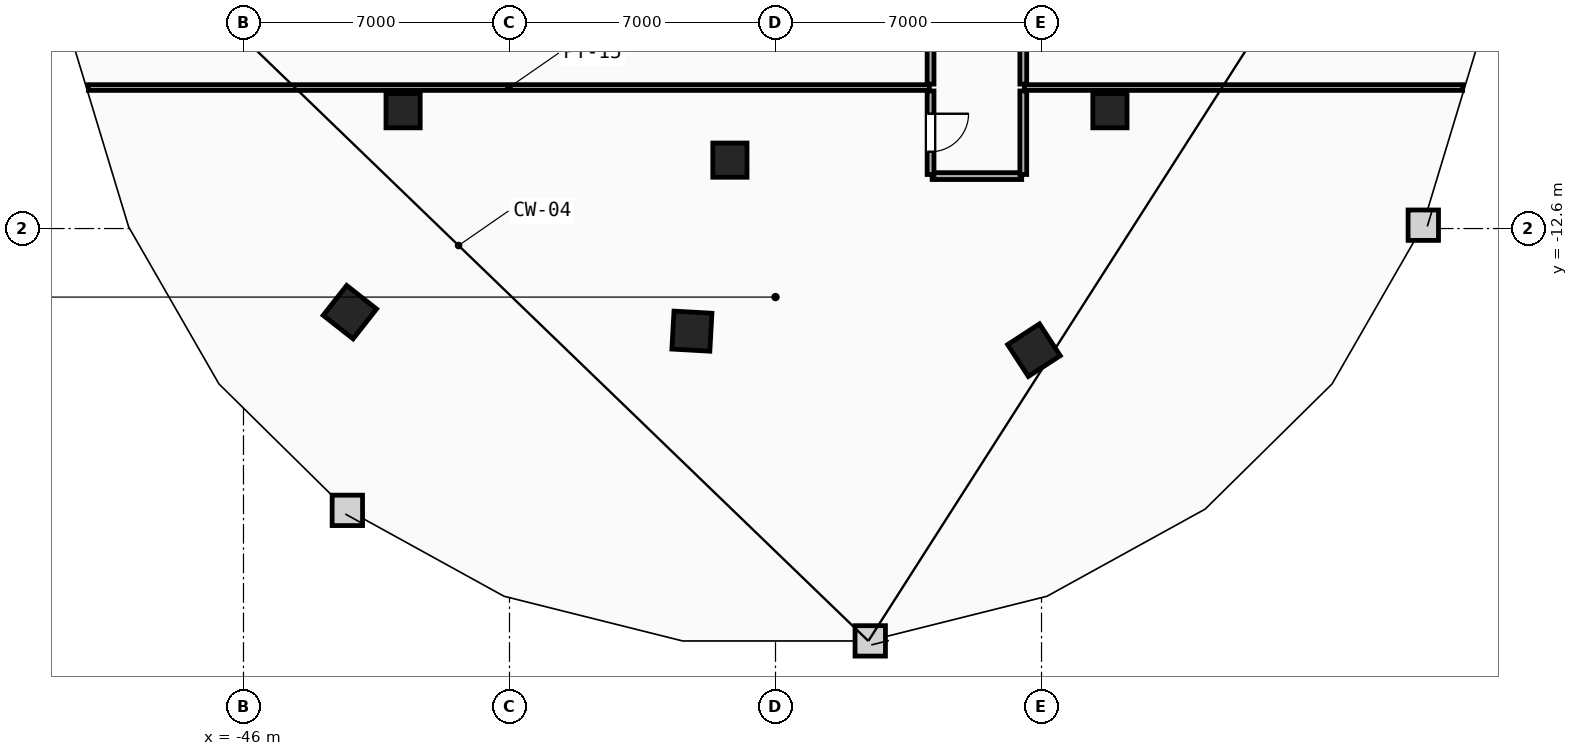
"""IFC4 building model, lengths in metres.
Left out: names, types, materials, properties, quantities, classifications, styles, units other than length and angle.
Written with IfcOpenShell. Run it as: python <this file> out.ifc"""

import sys

from ifc_helpers import new_model, si_unit, direction, frame, frame_2d, origin, origin_2d, place, context, subcontext, project, spatial, rectangle, extrude, element, fill, save


model = new_model("IFC4")
c1 = context("Model", 3, precision=1e-05, world=origin(), true_north=direction((0.0, 1.0)))
c2 = subcontext(c1, "Body", "Model", "MODEL_VIEW")
j1 = project(units=[si_unit("LENGTHUNIT", "METRE"), si_unit("PLANEANGLEUNIT", "RADIAN")], contexts=[c1])
p1 = place(None, origin())
s1 = spatial("IfcSite", under=j1, at=p1, CompositionType="ELEMENT")
p2 = place(p1, origin())
s2 = spatial("IfcBuilding", under=s1, at=p2, CompositionType="ELEMENT")
p3 = place(p2, frame((0.0, 0.0, 158.4)))
s3 = spatial("IfcBuildingStorey", under=s2, at=p3, CompositionType="ELEMENT", Elevation=158.4)
for number, where, z_axis, x_axis in (
    (1, (-41.8, -9.5, 0.0), (0.0, 0.0, 1.0), (1.0, 0.0, 0.0)),
    (2, (-33.2, -10.8, 0.0), (0.0, 0.0, 1.0), (1.0, 0.0, 0.0)),
    (3, (-23.2, -9.5, 0.0), (0.0, 0.0, 1.0), (1.0, 0.0, 0.0)),
):
    element("IfcColumn", number, at=place(p3, frame(where, z_axis=z_axis, x_axis=x_axis)), inside=s3, PredefinedType="COLUMN", context=c2, shape_type="SweptSolid", body=[
        extrude(rectangle(XDim=0.9, YDim=0.9, at=origin_2d()), origin(), (0.0, 0.0, 1.0), 3.6),
    ])
for number, where, z_axis, x_axis in (
    (4, (-43.2, -14.8, 0.0), (0.0, 0.0, 1.0), (0.786, -0.618, 0.0)),
    (5, (-34.2, -15.3, 0.0), (0.0, 0.0, 1.0), (0.998, -0.055, 0.0)),
    (6, (-25.2, -15.8, 0.0), (0.0, 0.0, 1.0), (0.838, 0.546, 0.0)),
):
    element("IfcColumn", number, at=place(p3, frame(where, z_axis=z_axis, x_axis=x_axis)), inside=s3, PredefinedType="COLUMN", context=c2, shape_type="SweptSolid", body=[
        extrude(rectangle(XDim=1.0, YDim=1.0, at=origin_2d()), origin(), (0.0, 0.0, 1.0), 3.6),
    ])
p4 = place(p3, frame((-50.082, -8.89, 0.0), z_axis=(0.0, 0.0, 1.0), x_axis=(1.0, 0.0, 0.0)))
e7 = element("IfcWall", 7, at=p4, inside=s3, PredefinedType="PARTITIONING", context=c2, shape_type="SweptSolid", body=[
    extrude(rectangle(XDim=22.132, YDim=0.15, at=frame_2d((11.066, 0.0))), origin(), (0.0, 0.0, 1.0), 3.36),
])
p5 = place(p3, frame((-25.45, -8.89, 0.0), z_axis=(0.0, 0.0, 1.0), x_axis=(1.0, 0.0, 0.0)))
e8 = element("IfcWall", 8, at=p5, inside=s3, PredefinedType="PARTITIONING", context=c2, shape_type="SweptSolid", body=[
    extrude(rectangle(XDim=11.532, YDim=0.15, at=frame_2d((5.766, 0.0))), origin(), (0.0, 0.0, 1.0), 3.36),
])
p6 = place(p3, frame((-27.878, -11.22, 0.0), z_axis=(0.0, 0.0, 1.0), x_axis=(1.0, 0.0, 0.0)))
e9 = element("IfcWall", 9, at=p6, inside=s3, PredefinedType="PARTITIONING", context=c2, shape_type="SweptSolid", body=[
    extrude(rectangle(XDim=2.357, YDim=0.18, at=frame_2d((1.178, 0.0))), origin(), (0.0, 0.0, 1.0), 3.36),
])
p7 = place(p3, frame((-27.92, -8.98, 0.0), z_axis=(0.0, 0.0, 1.0), x_axis=(0.0, -1.0, 0.0)))
e10 = element("IfcWall", 10, at=p7, inside=s3, PredefinedType="PARTITIONING", context=c2, shape_type="SweptSolid", body=[
    extrude(rectangle(XDim=2.198, YDim=0.18, at=frame_2d((1.099, 0.0))), origin(), (0.0, 0.0, 1.0), 3.36),
])
p8 = place(p7, frame((0.599, 0.0, 0.0)))
e11 = element("IfcOpeningElement", 11, at=p8, cuts=e10, PredefinedType="OPENING", context=c2, shape_type="SweptSolid", body=[
    extrude(rectangle(XDim=1.0, YDim=2.15, at=frame_2d((0.5, 1.075))), frame((0.0, 0.1, 0.0), z_axis=(0.0, -1.0, 0.0), x_axis=(1.0, 0.0, 0.0)), (0.0, 0.0, 1.0), 0.2),
])
p9 = place(p3, frame((-25.48, -11.178, 0.0), z_axis=(0.0, 0.0, 1.0), x_axis=(0.0, 1.0, 0.0)))
e12 = element("IfcWall", 12, at=p9, inside=s3, PredefinedType="PARTITIONING", context=c2, shape_type="SweptSolid", body=[
    extrude(rectangle(XDim=2.198, YDim=0.18, at=frame_2d((1.099, 0.0))), origin(), (0.0, 0.0, 1.0), 3.36),
])
p10 = place(p3, frame((-27.92, -0.45, 0.0), z_axis=(0.0, 0.0, 1.0), x_axis=(0.0, -1.0, 0.0)))
e13 = element("IfcWall", 13, at=p10, inside=s3, PredefinedType="PARTITIONING", context=c2, shape_type="SweptSolid", body=[
    extrude(rectangle(XDim=8.35, YDim=0.18, at=frame_2d((4.175, 0.0))), origin(), (0.0, 0.0, 1.0), 3.36),
])
p11 = place(p10, frame((3.675, 0.0, 0.0)))
e14 = element("IfcOpeningElement", 14, at=p11, cuts=e13, PredefinedType="OPENING", context=c2, shape_type="SweptSolid", body=[
    extrude(rectangle(XDim=1.0, YDim=2.15, at=frame_2d((0.5, 1.075))), frame((0.0, 0.1, 0.0), z_axis=(0.0, -1.0, 0.0), x_axis=(1.0, 0.0, 0.0)), (0.0, 0.0, 1.0), 0.2),
])
p12 = place(p3, frame((-25.48, -8.8, 0.0), z_axis=(0.0, 0.0, 1.0), x_axis=(0.0, 1.0, 0.0)))
e15 = element("IfcWall", 15, at=p12, inside=s3, PredefinedType="PARTITIONING", context=c2, shape_type="SweptSolid", body=[
    extrude(rectangle(XDim=8.35, YDim=0.18, at=frame_2d((4.175, 0.0))), origin(), (0.0, 0.0, 1.0), 3.36),
])
p13 = place(p8, origin())
e16 = element("IfcDoor", 16, at=p13, inside=s3, OperationType="SINGLE_SWING_LEFT", PredefinedType="DOOR", context=c2, shape_type="SweptSolid", body=[
    extrude(rectangle(XDim=1.0, YDim=2.15, at=frame_2d((0.5, 1.075))), frame((0.0, 0.025, 0.0), z_axis=(0.0, -1.0, 0.0), x_axis=(1.0, 0.0, 0.0)), (0.0, 0.0, 1.0), 0.05),
])
fill(e11, e16)
save(model, sys.argv[1])
